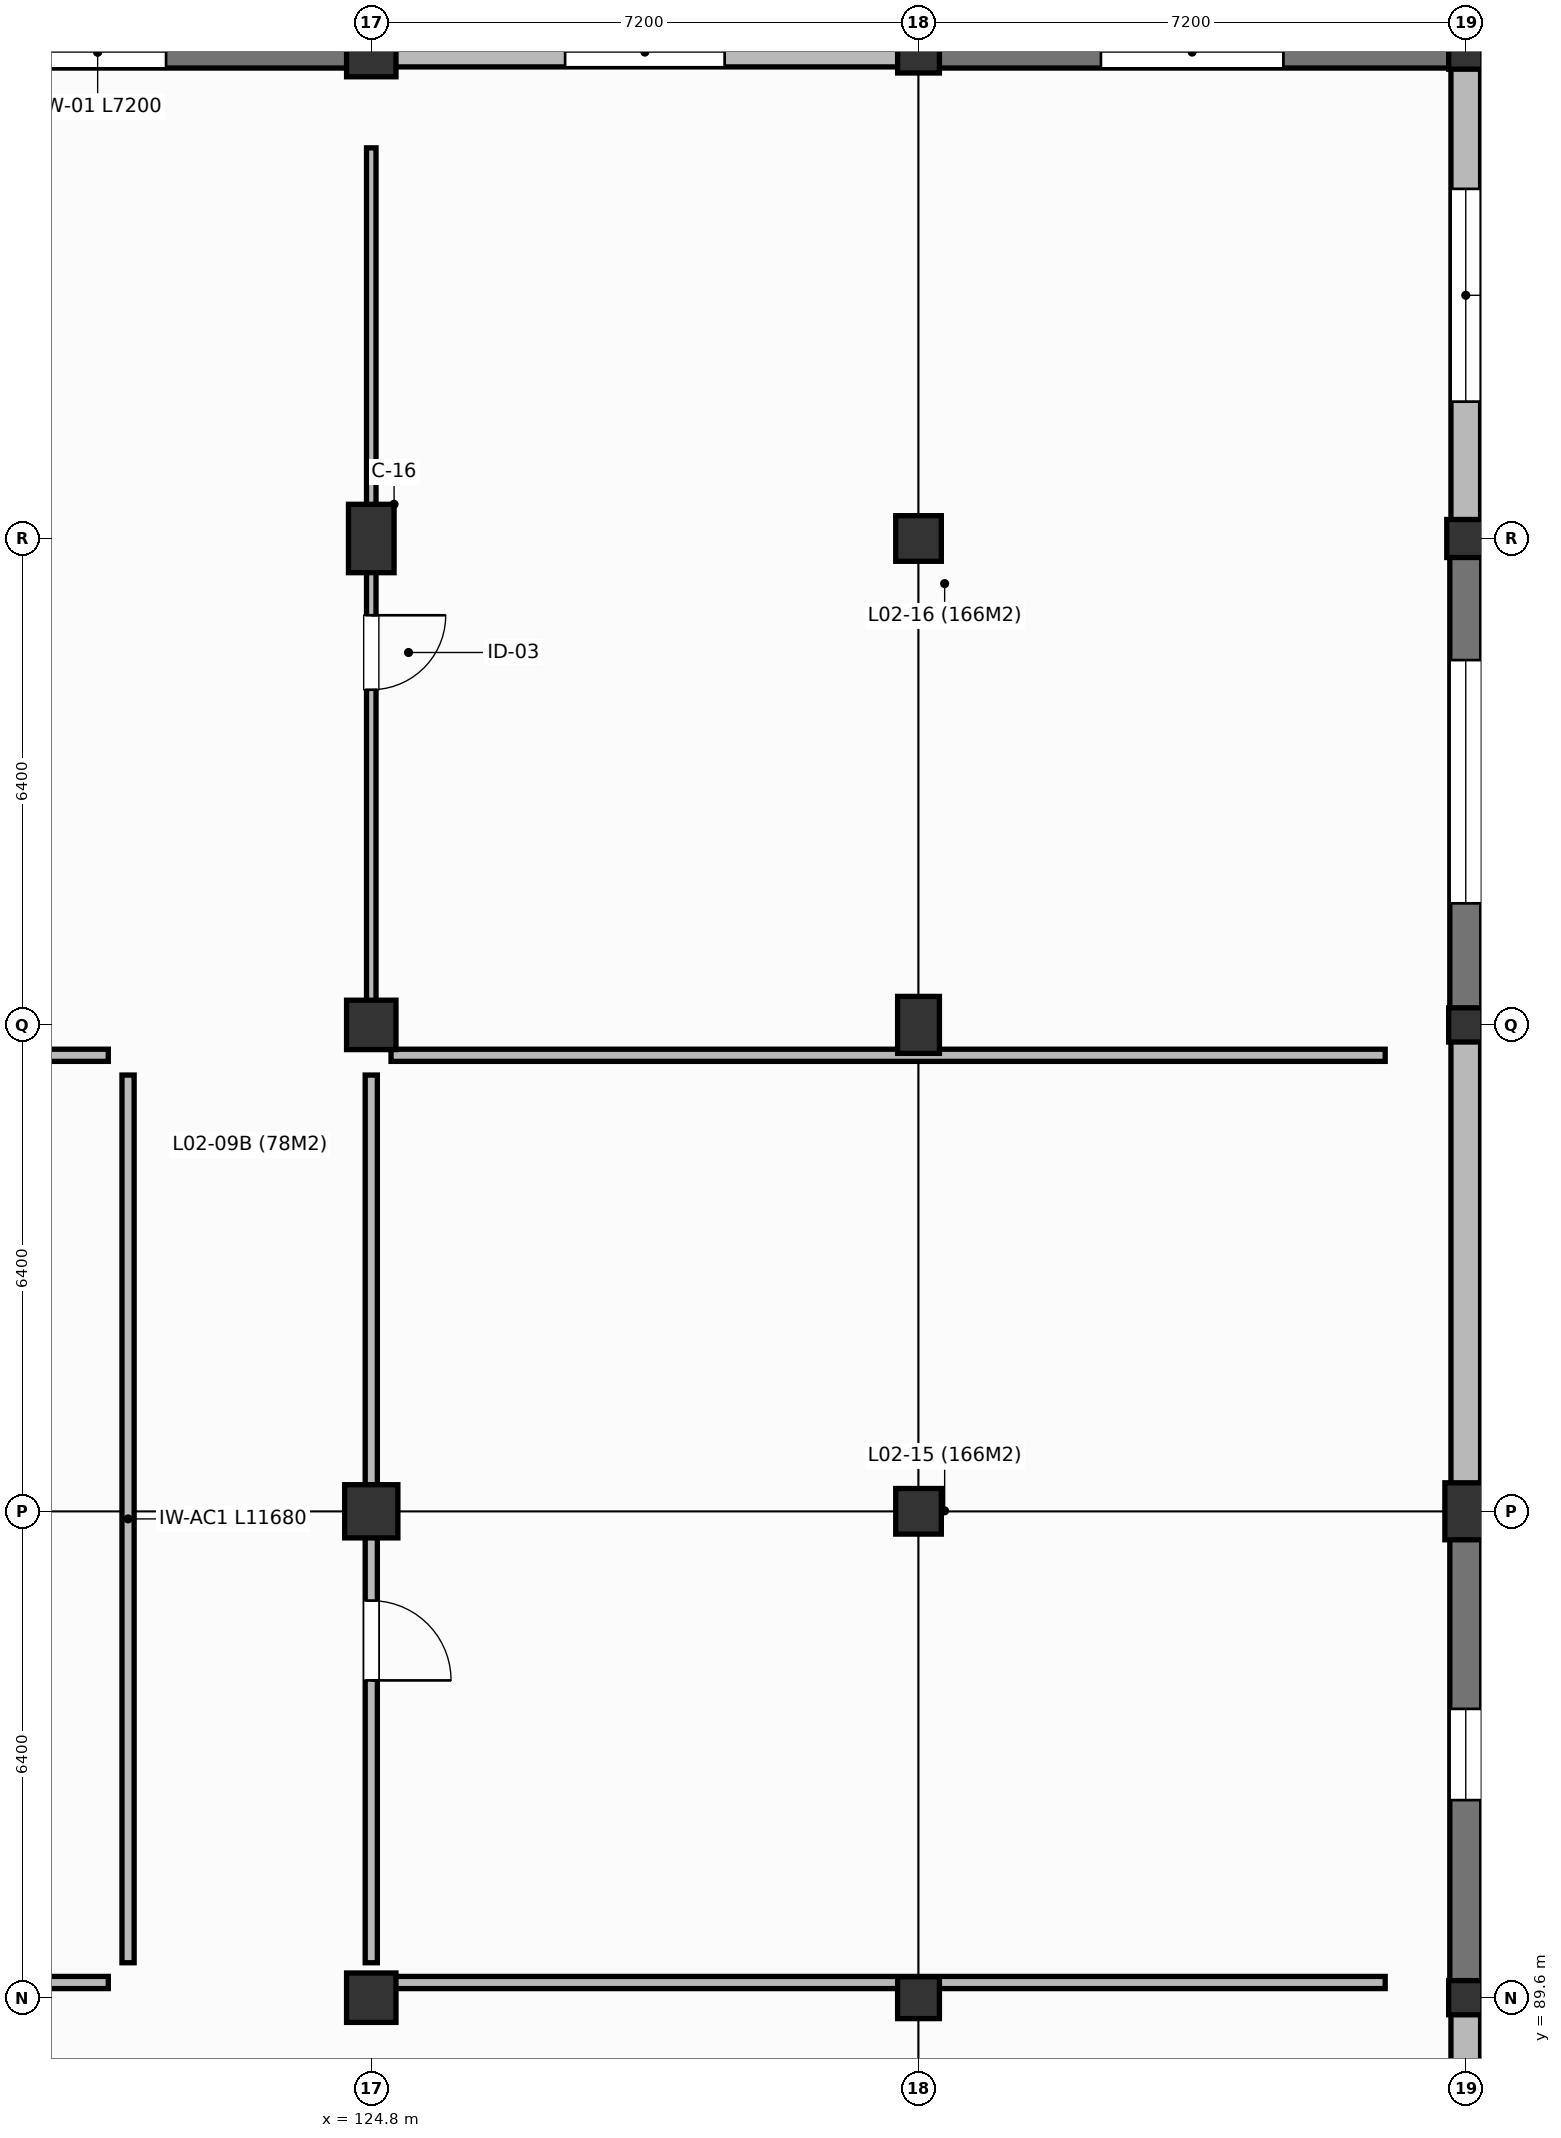
"""IFC4 building model, lengths in metres.
Left out: names, types, materials, properties, quantities, classifications, styles, units other than length and angle.
Written with IfcOpenShell. Run it as: python <this file> out.ifc"""

import sys

from ifc_helpers import new_model, si_unit, direction, frame, frame_2d, origin, origin_2d, place, context, subcontext, project, spatial, rectangle, extrude, element, fill, save


model = new_model("IFC4")
c1 = context("Model", 3, precision=1e-05, world=origin(), true_north=direction((0.0, 1.0)))
c2 = subcontext(c1, "Body", "Model", "MODEL_VIEW")
j1 = project(units=[si_unit("LENGTHUNIT", "METRE"), si_unit("PLANEANGLEUNIT", "RADIAN")], contexts=[c1])
p1 = place(None, origin())
s1 = spatial("IfcSite", under=j1, at=p1, CompositionType="ELEMENT")
p2 = place(p1, origin())
s2 = spatial("IfcBuilding", under=s1, at=p2, CompositionType="ELEMENT")
p3 = place(p2, frame((0.0, 0.0, 9.0)))
s3 = spatial("IfcBuildingStorey", under=s2, at=p3, CompositionType="ELEMENT", Elevation=9.0)
p4 = place(p3, frame((124.8, 89.6, 0.0), z_axis=(0.0, 0.0, 1.0), x_axis=(1.0, 0.0, 0.0)))
e1 = element("IfcColumn", 1, at=p4, inside=s3, PredefinedType="COLUMN", context=c2, shape_type="SweptSolid", body=[
    extrude(rectangle(XDim=0.65, YDim=0.65, at=origin_2d()), origin(), (0.0, 0.0, 1.0), 4.2),
])
p5 = place(p3, frame((124.8, 96.0, 0.0), z_axis=(0.0, 0.0, 1.0), x_axis=(1.0, 0.0, 0.0)))
e2 = element("IfcColumn", 2, at=p5, inside=s3, PredefinedType="COLUMN", context=c2, shape_type="SweptSolid", body=[
    extrude(rectangle(XDim=0.7, YDim=0.7, at=origin_2d()), origin(), (0.0, 0.0, 1.0), 4.2),
])
p6 = place(p3, frame((124.8, 102.4, 0.0), z_axis=(0.0, 0.0, 1.0), x_axis=(1.0, 0.0, 0.0)))
e3 = element("IfcColumn", 3, at=p6, inside=s3, PredefinedType="COLUMN", context=c2, shape_type="SweptSolid", body=[
    extrude(rectangle(XDim=0.65, YDim=0.65, at=origin_2d()), origin(), (0.0, 0.0, 1.0), 4.2),
])
p7 = place(p3, frame((124.8, 108.8, 0.0), z_axis=(0.0, 0.0, 1.0), x_axis=(1.0, 0.0, 0.0)))
e4 = element("IfcColumn", 4, at=p7, inside=s3, PredefinedType="COLUMN", context=c2, shape_type="SweptSolid", body=[
    extrude(rectangle(XDim=0.6, YDim=0.9, at=origin_2d()), origin(), (0.0, 0.0, 1.0), 4.2),
])
p8 = place(p3, frame((124.8, 115.2, 0.0), z_axis=(0.0, 0.0, 1.0), x_axis=(1.0, 0.0, 0.0)))
e5 = element("IfcColumn", 5, at=p8, inside=s3, PredefinedType="COLUMN", context=c2, shape_type="SweptSolid", body=[
    extrude(rectangle(XDim=0.65, YDim=0.65, at=origin_2d()), origin(), (0.0, 0.0, 1.0), 4.2),
])
p9 = place(p3, frame((132.0, 89.6, 0.0), z_axis=(0.0, 0.0, 1.0), x_axis=(1.0, 0.0, 0.0)))
e6 = element("IfcColumn", 6, at=p9, inside=s3, PredefinedType="COLUMN", context=c2, shape_type="SweptSolid", body=[
    extrude(rectangle(XDim=0.55, YDim=0.55, at=origin_2d()), origin(), (0.0, 0.0, 1.0), 4.2),
])
p10 = place(p3, frame((132.0, 96.0, 0.0), z_axis=(0.0, 0.0, 1.0), x_axis=(1.0, 0.0, 0.0)))
e7 = element("IfcColumn", 7, at=p10, inside=s3, PredefinedType="COLUMN", context=c2, shape_type="SweptSolid", body=[
    extrude(rectangle(XDim=0.6, YDim=0.6, at=origin_2d()), origin(), (0.0, 0.0, 1.0), 4.2),
])
p11 = place(p3, frame((132.0, 102.4, 0.0), z_axis=(0.0, 0.0, 1.0), x_axis=(1.0, 0.0, 0.0)))
e8 = element("IfcColumn", 8, at=p11, inside=s3, PredefinedType="COLUMN", context=c2, shape_type="SweptSolid", body=[
    extrude(rectangle(XDim=0.55, YDim=0.75, at=origin_2d()), origin(), (0.0, 0.0, 1.0), 4.2),
])
p12 = place(p3, frame((132.0, 108.8, 0.0), z_axis=(0.0, 0.0, 1.0), x_axis=(1.0, 0.0, 0.0)))
e9 = element("IfcColumn", 9, at=p12, inside=s3, PredefinedType="COLUMN", context=c2, shape_type="SweptSolid", body=[
    extrude(rectangle(XDim=0.6, YDim=0.6, at=origin_2d()), origin(), (0.0, 0.0, 1.0), 4.2),
])
p13 = place(p3, frame((132.0, 115.2, 0.0), z_axis=(0.0, 0.0, 1.0), x_axis=(1.0, 0.0, 0.0)))
e10 = element("IfcColumn", 10, at=p13, inside=s3, PredefinedType="COLUMN", context=c2, shape_type="SweptSolid", body=[
    extrude(rectangle(XDim=0.55, YDim=0.55, at=origin_2d()), origin(), (0.0, 0.0, 1.0), 4.2),
])
p14 = place(p3, frame((139.2, 89.6, 0.0), z_axis=(0.0, 0.0, 1.0), x_axis=(1.0, 0.0, 0.0)))
e11 = element("IfcColumn", 11, at=p14, inside=s3, PredefinedType="COLUMN", context=c2, shape_type="SweptSolid", body=[
    extrude(rectangle(XDim=0.45, YDim=0.45, at=origin_2d()), origin(), (0.0, 0.0, 1.0), 4.2),
])
p15 = place(p3, frame((139.2, 96.0, 0.0), z_axis=(0.0, 0.0, 1.0), x_axis=(1.0, 0.0, 0.0)))
e12 = element("IfcColumn", 12, at=p15, inside=s3, PredefinedType="COLUMN", context=c2, shape_type="SweptSolid", body=[
    extrude(rectangle(XDim=0.55, YDim=0.75, at=origin_2d()), origin(), (0.0, 0.0, 1.0), 4.2),
])
p16 = place(p3, frame((139.2, 102.4, 0.0), z_axis=(0.0, 0.0, 1.0), x_axis=(1.0, 0.0, 0.0)))
e13 = element("IfcColumn", 13, at=p16, inside=s3, PredefinedType="COLUMN", context=c2, shape_type="SweptSolid", body=[
    extrude(rectangle(XDim=0.45, YDim=0.45, at=origin_2d()), origin(), (0.0, 0.0, 1.0), 4.2),
])
p17 = place(p3, frame((139.2, 108.8, 0.0), z_axis=(0.0, 0.0, 1.0), x_axis=(1.0, 0.0, 0.0)))
e14 = element("IfcColumn", 14, at=p17, inside=s3, PredefinedType="COLUMN", context=c2, shape_type="SweptSolid", body=[
    extrude(rectangle(XDim=0.5, YDim=0.5, at=origin_2d()), origin(), (0.0, 0.0, 1.0), 4.2),
])
p18 = place(p3, frame((139.2, 115.2, 0.0), z_axis=(0.0, 0.0, 1.0), x_axis=(1.0, 0.0, 0.0)))
e15 = element("IfcColumn", 15, at=p18, inside=s3, PredefinedType="COLUMN", context=c2, shape_type="SweptSolid", body=[
    extrude(rectangle(XDim=0.45, YDim=0.45, at=origin_2d()), origin(), (0.0, 0.0, 1.0), 4.2),
])
p19 = place(p3, frame((117.6, 115.2, 0.0), z_axis=(0.0, 0.0, 1.0), x_axis=(1.0, 0.0, 0.0)))
e16 = element("IfcWall", 16, at=p19, inside=s3, PredefinedType="STANDARD", context=c2, shape_type="SweptSolid", body=[
    extrude(rectangle(XDim=7.2, YDim=0.42, at=frame_2d((3.6, 0.0))), origin(), (0.0, 0.0, 1.0), 3.84),
])
p20 = place(p19, frame((2.7, 0.0, 0.8)))
e17 = element("IfcOpeningElement", 17, at=p20, cuts=e16, PredefinedType="OPENING", context=c2, shape_type="SweptSolid", body=[
    extrude(rectangle(XDim=1.8, YDim=1.45, at=frame_2d((0.9, 0.725))), frame((0.0, 0.22, 0.0), z_axis=(0.0, -1.0, 0.0), x_axis=(1.0, 0.0, 0.0)), (0.0, 0.0, 1.0), 0.44),
])
p21 = place(p3, frame((124.8, 115.2, 0.0), z_axis=(0.0, 0.0, 1.0), x_axis=(1.0, 0.0, 0.0)))
e18 = element("IfcWall", 18, at=p21, inside=s3, PredefinedType="STANDARD", context=c2, shape_type="SweptSolid", body=[
    extrude(rectangle(XDim=7.2, YDim=0.39, at=frame_2d((3.6, 0.0))), origin(), (0.0, 0.0, 1.0), 3.29),
])
p22 = place(p21, frame((2.55, 0.0, 0.8)))
e19 = element("IfcOpeningElement", 19, at=p22, cuts=e18, PredefinedType="OPENING", context=c2, shape_type="SweptSolid", body=[
    extrude(rectangle(XDim=2.1, YDim=1.45, at=frame_2d((1.05, 0.725))), frame((0.0, 0.205, 0.0), z_axis=(0.0, -1.0, 0.0), x_axis=(1.0, 0.0, 0.0)), (0.0, 0.0, 1.0), 0.41),
])
p23 = place(p3, frame((132.0, 115.2, 0.0), z_axis=(0.0, 0.0, 1.0), x_axis=(1.0, 0.0, 0.0)))
e20 = element("IfcWall", 20, at=p23, inside=s3, PredefinedType="STANDARD", context=c2, shape_type="SweptSolid", body=[
    extrude(rectangle(XDim=7.2, YDim=0.42, at=frame_2d((3.6, 0.0))), origin(), (0.0, 0.0, 1.0), 3.84),
])
p24 = place(p23, frame((2.4, 0.0, 0.8)))
e21 = element("IfcOpeningElement", 21, at=p24, cuts=e20, PredefinedType="OPENING", context=c2, shape_type="SweptSolid", body=[
    extrude(rectangle(XDim=2.4, YDim=1.45, at=frame_2d((1.2, 0.725))), frame((0.0, 0.22, 0.0), z_axis=(0.0, -1.0, 0.0), x_axis=(1.0, 0.0, 0.0)), (0.0, 0.0, 1.0), 0.44),
])
p25 = place(p3, frame((139.2, 115.2, 0.0), z_axis=(0.0, 0.0, 1.0), x_axis=(0.0, -1.0, 0.0)))
e22 = element("IfcWall", 22, at=p25, inside=s3, PredefinedType="STANDARD", context=c2, shape_type="SweptSolid", body=[
    extrude(rectangle(XDim=6.4, YDim=0.39, at=frame_2d((3.2, 0.0))), origin(), (0.0, 0.0, 1.0), 2.99),
])
p26 = place(p25, frame((1.8, 0.0, 0.8)))
e23 = element("IfcOpeningElement", 23, at=p26, cuts=e22, PredefinedType="OPENING", context=c2, shape_type="SweptSolid", body=[
    extrude(rectangle(XDim=2.8, YDim=1.6, at=frame_2d((1.4, 0.8))), frame((0.0, 0.205, 0.0), z_axis=(0.0, -1.0, 0.0), x_axis=(1.0, 0.0, 0.0)), (0.0, 0.0, 1.0), 0.41),
])
p27 = place(p3, frame((139.2, 108.8, 0.0), z_axis=(0.0, 0.0, 1.0), x_axis=(0.0, -1.0, 0.0)))
e24 = element("IfcWall", 24, at=p27, inside=s3, PredefinedType="STANDARD", context=c2, shape_type="SweptSolid", body=[
    extrude(rectangle(XDim=6.4, YDim=0.42, at=frame_2d((3.2, 0.0))), origin(), (0.0, 0.0, 1.0), 3.84),
])
p28 = place(p27, frame((1.6, 0.0, 0.8)))
e25 = element("IfcOpeningElement", 25, at=p28, cuts=e24, PredefinedType="OPENING", context=c2, shape_type="SweptSolid", body=[
    extrude(rectangle(XDim=3.2, YDim=1.6, at=frame_2d((1.6, 0.8))), frame((0.0, 0.22, 0.0), z_axis=(0.0, -1.0, 0.0), x_axis=(1.0, 0.0, 0.0)), (0.0, 0.0, 1.0), 0.44),
])
p29 = place(p3, frame((139.2, 102.4, 0.0), z_axis=(0.0, 0.0, 1.0), x_axis=(0.0, -1.0, 0.0)))
e26 = element("IfcWall", 26, at=p29, inside=s3, PredefinedType="STANDARD", context=c2, shape_type="SweptSolid", body=[
    extrude(rectangle(XDim=6.4, YDim=0.39, at=frame_2d((3.2, 0.0))), origin(), (0.0, 0.0, 1.0), 3.04),
])
p30 = place(p3, frame((139.2, 96.0, 0.0), z_axis=(0.0, 0.0, 1.0), x_axis=(0.0, -1.0, 0.0)))
e27 = element("IfcWall", 27, at=p30, inside=s3, PredefinedType="STANDARD", context=c2, shape_type="SweptSolid", body=[
    extrude(rectangle(XDim=6.4, YDim=0.42, at=frame_2d((3.2, 0.0))), origin(), (0.0, 0.0, 1.0), 3.84),
])
p31 = place(p30, frame((2.6, 0.0, 0.8)))
e28 = element("IfcOpeningElement", 28, at=p31, cuts=e27, PredefinedType="OPENING", context=c2, shape_type="SweptSolid", body=[
    extrude(rectangle(XDim=1.2, YDim=1.65, at=frame_2d((0.6, 0.825))), frame((0.0, 0.22, 0.0), z_axis=(0.0, -1.0, 0.0), x_axis=(1.0, 0.0, 0.0)), (0.0, 0.0, 1.0), 0.44),
])
p32 = place(p3, frame((139.2, 89.6, 0.0), z_axis=(0.0, 0.0, 1.0), x_axis=(0.0, -1.0, 0.0)))
e29 = element("IfcWall", 29, at=p32, inside=s3, PredefinedType="STANDARD", context=c2, shape_type="SweptSolid", body=[
    extrude(rectangle(XDim=6.4, YDim=0.39, at=frame_2d((3.2, 0.0))), origin(), (0.0, 0.0, 1.0), 2.64),
])
p33 = place(p32, frame((2.45, 0.0, 0.8)))
e30 = element("IfcOpeningElement", 30, at=p33, cuts=e29, PredefinedType="OPENING", context=c2, shape_type="SweptSolid", body=[
    extrude(rectangle(XDim=1.5, YDim=1.65, at=frame_2d((0.75, 0.825))), frame((0.0, 0.205, 0.0), z_axis=(0.0, -1.0, 0.0), x_axis=(1.0, 0.0, 0.0)), (0.0, 0.0, 1.0), 0.41),
])
p34 = place(p3, frame((109.86, 89.8, 0.0), z_axis=(0.0, 0.0, 1.0), x_axis=(1.0, 0.0, 0.0)))
e31 = element("IfcWall", 31, at=p34, inside=s3, PredefinedType="PARTITIONING", context=c2, shape_type="SweptSolid", body=[
    extrude(rectangle(XDim=11.48, YDim=0.16, at=frame_2d((5.74, 0.0))), origin(), (0.0, 0.0, 1.0), 3.115),
])
p35 = place(p34, frame((5.215, 0.0, 0.0)))
e32 = element("IfcOpeningElement", 32, at=p35, cuts=e31, PredefinedType="OPENING", context=c2, shape_type="SweptSolid", body=[
    extrude(rectangle(XDim=1.05, YDim=2.1, at=frame_2d((0.525, 1.05))), frame((0.0, 0.09, 0.0), z_axis=(0.0, -1.0, 0.0), x_axis=(1.0, 0.0, 0.0)), (0.0, 0.0, 1.0), 0.18),
])
p36 = place(p3, frame((121.6, 90.06, 0.0), z_axis=(0.0, 0.0, 1.0), x_axis=(0.0, 1.0, 0.0)))
e33 = element("IfcWall", 33, at=p36, inside=s3, PredefinedType="PARTITIONING", context=c2, shape_type="SweptSolid", body=[
    extrude(rectangle(XDim=11.68, YDim=0.16, at=frame_2d((5.84, 0.0))), origin(), (0.0, 0.0, 1.0), 3.365),
])
p37 = place(p3, frame((121.34, 102.0, 0.0), z_axis=(0.0, 0.0, 1.0), x_axis=(-1.0, 0.0, 0.0)))
e34 = element("IfcWall", 34, at=p37, inside=s3, PredefinedType="PARTITIONING", context=c2, shape_type="SweptSolid", body=[
    extrude(rectangle(XDim=11.48, YDim=0.16, at=frame_2d((5.74, 0.0))), origin(), (0.0, 0.0, 1.0), 3.065),
])
p38 = place(p3, frame((125.06, 89.8, 0.0), z_axis=(0.0, 0.0, 1.0), x_axis=(1.0, 0.0, 0.0)))
e35 = element("IfcWall", 35, at=p38, inside=s3, PredefinedType="PARTITIONING", context=c2, shape_type="SweptSolid", body=[
    extrude(rectangle(XDim=13.08, YDim=0.16, at=frame_2d((6.54, 0.0))), origin(), (0.0, 0.0, 1.0), 3.065),
])
p39 = place(p3, frame((138.14, 102.0, 0.0), z_axis=(0.0, 0.0, 1.0), x_axis=(-1.0, 0.0, 0.0)))
e36 = element("IfcWall", 36, at=p39, inside=s3, PredefinedType="PARTITIONING", context=c2, shape_type="SweptSolid", body=[
    extrude(rectangle(XDim=13.08, YDim=0.16, at=frame_2d((6.54, 0.0))), origin(), (0.0, 0.0, 1.0), 3.015),
])
p40 = place(p3, frame((124.8, 101.74, 0.0), z_axis=(0.0, 0.0, 1.0), x_axis=(0.0, -1.0, 0.0)))
e37 = element("IfcWall", 37, at=p40, inside=s3, PredefinedType="PARTITIONING", context=c2, shape_type="SweptSolid", body=[
    extrude(rectangle(XDim=11.68, YDim=0.16, at=frame_2d((5.84, 0.0))), origin(), (0.0, 0.0, 1.0), 2.615),
])
p41 = place(p40, frame((6.915, 0.0, 0.0)))
e38 = element("IfcOpeningElement", 38, at=p41, cuts=e37, PredefinedType="OPENING", context=c2, shape_type="SweptSolid", body=[
    extrude(rectangle(XDim=1.05, YDim=2.1, at=frame_2d((0.525, 1.05))), frame((0.0, 0.09, 0.0), z_axis=(0.0, -1.0, 0.0), x_axis=(1.0, 0.0, 0.0)), (0.0, 0.0, 1.0), 0.18),
])
p42 = place(p3, frame((124.8, 113.94, 0.0), z_axis=(0.0, 0.0, 1.0), x_axis=(0.0, -1.0, 0.0)))
e39 = element("IfcWall", 39, at=p42, inside=s3, PredefinedType="PARTITIONING", context=c2, shape_type="SweptSolid", body=[
    extrude(rectangle(XDim=11.68, YDim=0.125, at=frame_2d((5.84, 0.0))), origin(), (0.0, 0.0, 1.0), 2.615),
])
p43 = place(p42, frame((6.15, 0.0, 0.0)))
e40 = element("IfcOpeningElement", 40, at=p43, cuts=e39, PredefinedType="OPENING", context=c2, shape_type="SweptSolid", body=[
    extrude(rectangle(XDim=0.98, YDim=2.1, at=frame_2d((0.49, 1.05))), frame((0.0, 0.073, 0.0), z_axis=(0.0, -1.0, 0.0), x_axis=(1.0, 0.0, 0.0)), (0.0, 0.0, 1.0), 0.145),
])
p44 = place(p20, origin())
e41 = element("IfcWindow", 41, at=p44, inside=s3, PartitioningType="SINGLE_PANEL", PredefinedType="WINDOW", context=c2, shape_type="SweptSolid", body=[
    extrude(rectangle(XDim=1.8, YDim=1.45, at=frame_2d((0.9, 0.725))), frame((0.0, 0.03, 0.0), z_axis=(0.0, -1.0, 0.0), x_axis=(1.0, 0.0, 0.0)), (0.0, 0.0, 1.0), 0.06),
])
fill(e17, e41)
p45 = place(p22, origin())
e42 = element("IfcWindow", 42, at=p45, inside=s3, PartitioningType="SINGLE_PANEL", PredefinedType="WINDOW", context=c2, shape_type="SweptSolid", body=[
    extrude(rectangle(XDim=2.1, YDim=1.45, at=frame_2d((1.05, 0.725))), frame((0.0, 0.03, 0.0), z_axis=(0.0, -1.0, 0.0), x_axis=(1.0, 0.0, 0.0)), (0.0, 0.0, 1.0), 0.06),
])
fill(e19, e42)
p46 = place(p24, origin())
e43 = element("IfcWindow", 43, at=p46, inside=s3, PartitioningType="TRIPLE_PANEL_VERTICAL", PredefinedType="WINDOW", context=c2, shape_type="SweptSolid", body=[
    extrude(rectangle(XDim=2.4, YDim=1.45, at=frame_2d((1.2, 0.725))), frame((0.0, 0.03, 0.0), z_axis=(0.0, -1.0, 0.0), x_axis=(1.0, 0.0, 0.0)), (0.0, 0.0, 1.0), 0.06),
])
fill(e21, e43)
p47 = place(p26, origin())
e44 = element("IfcWindow", 44, at=p47, inside=s3, PartitioningType="TRIPLE_PANEL_VERTICAL", PredefinedType="WINDOW", context=c2, shape_type="SweptSolid", body=[
    extrude(rectangle(XDim=2.8, YDim=1.6, at=frame_2d((1.4, 0.8))), frame((0.0, 0.03, 0.0), z_axis=(0.0, -1.0, 0.0), x_axis=(1.0, 0.0, 0.0)), (0.0, 0.0, 1.0), 0.06),
])
fill(e23, e44)
p48 = place(p28, origin())
e45 = element("IfcWindow", 45, at=p48, inside=s3, PartitioningType="TRIPLE_PANEL_VERTICAL", PredefinedType="WINDOW", context=c2, shape_type="SweptSolid", body=[
    extrude(rectangle(XDim=3.2, YDim=1.6, at=frame_2d((1.6, 0.8))), frame((0.0, 0.03, 0.0), z_axis=(0.0, -1.0, 0.0), x_axis=(1.0, 0.0, 0.0)), (0.0, 0.0, 1.0), 0.06),
])
fill(e25, e45)
p49 = place(p31, origin())
e46 = element("IfcWindow", 46, at=p49, inside=s3, PartitioningType="SINGLE_PANEL", PredefinedType="WINDOW", context=c2, shape_type="SweptSolid", body=[
    extrude(rectangle(XDim=1.2, YDim=1.65, at=frame_2d((0.6, 0.825))), frame((0.0, 0.03, 0.0), z_axis=(0.0, -1.0, 0.0), x_axis=(1.0, 0.0, 0.0)), (0.0, 0.0, 1.0), 0.06),
])
fill(e28, e46)
p50 = place(p41, origin())
e47 = element("IfcDoor", 47, at=p50, inside=s3, OperationType="SINGLE_SWING_RIGHT", PredefinedType="DOOR", context=c2, shape_type="SweptSolid", body=[
    extrude(rectangle(XDim=1.05, YDim=2.1, at=frame_2d((0.525, 1.05))), frame((0.0, 0.025, 0.0), z_axis=(0.0, -1.0, 0.0), x_axis=(1.0, 0.0, 0.0)), (0.0, 0.0, 1.0), 0.05),
])
fill(e38, e47)
p51 = place(p43, origin())
e48 = element("IfcDoor", 48, at=p51, inside=s3, OperationType="SINGLE_SWING_LEFT", PredefinedType="DOOR", context=c2, shape_type="SweptSolid", body=[
    extrude(rectangle(XDim=0.98, YDim=2.1, at=frame_2d((0.49, 1.05))), frame((0.0, 0.025, 0.0), z_axis=(0.0, -1.0, 0.0), x_axis=(1.0, 0.0, 0.0)), (0.0, 0.0, 1.0), 0.05),
])
fill(e40, e48)
save(model, sys.argv[1])
